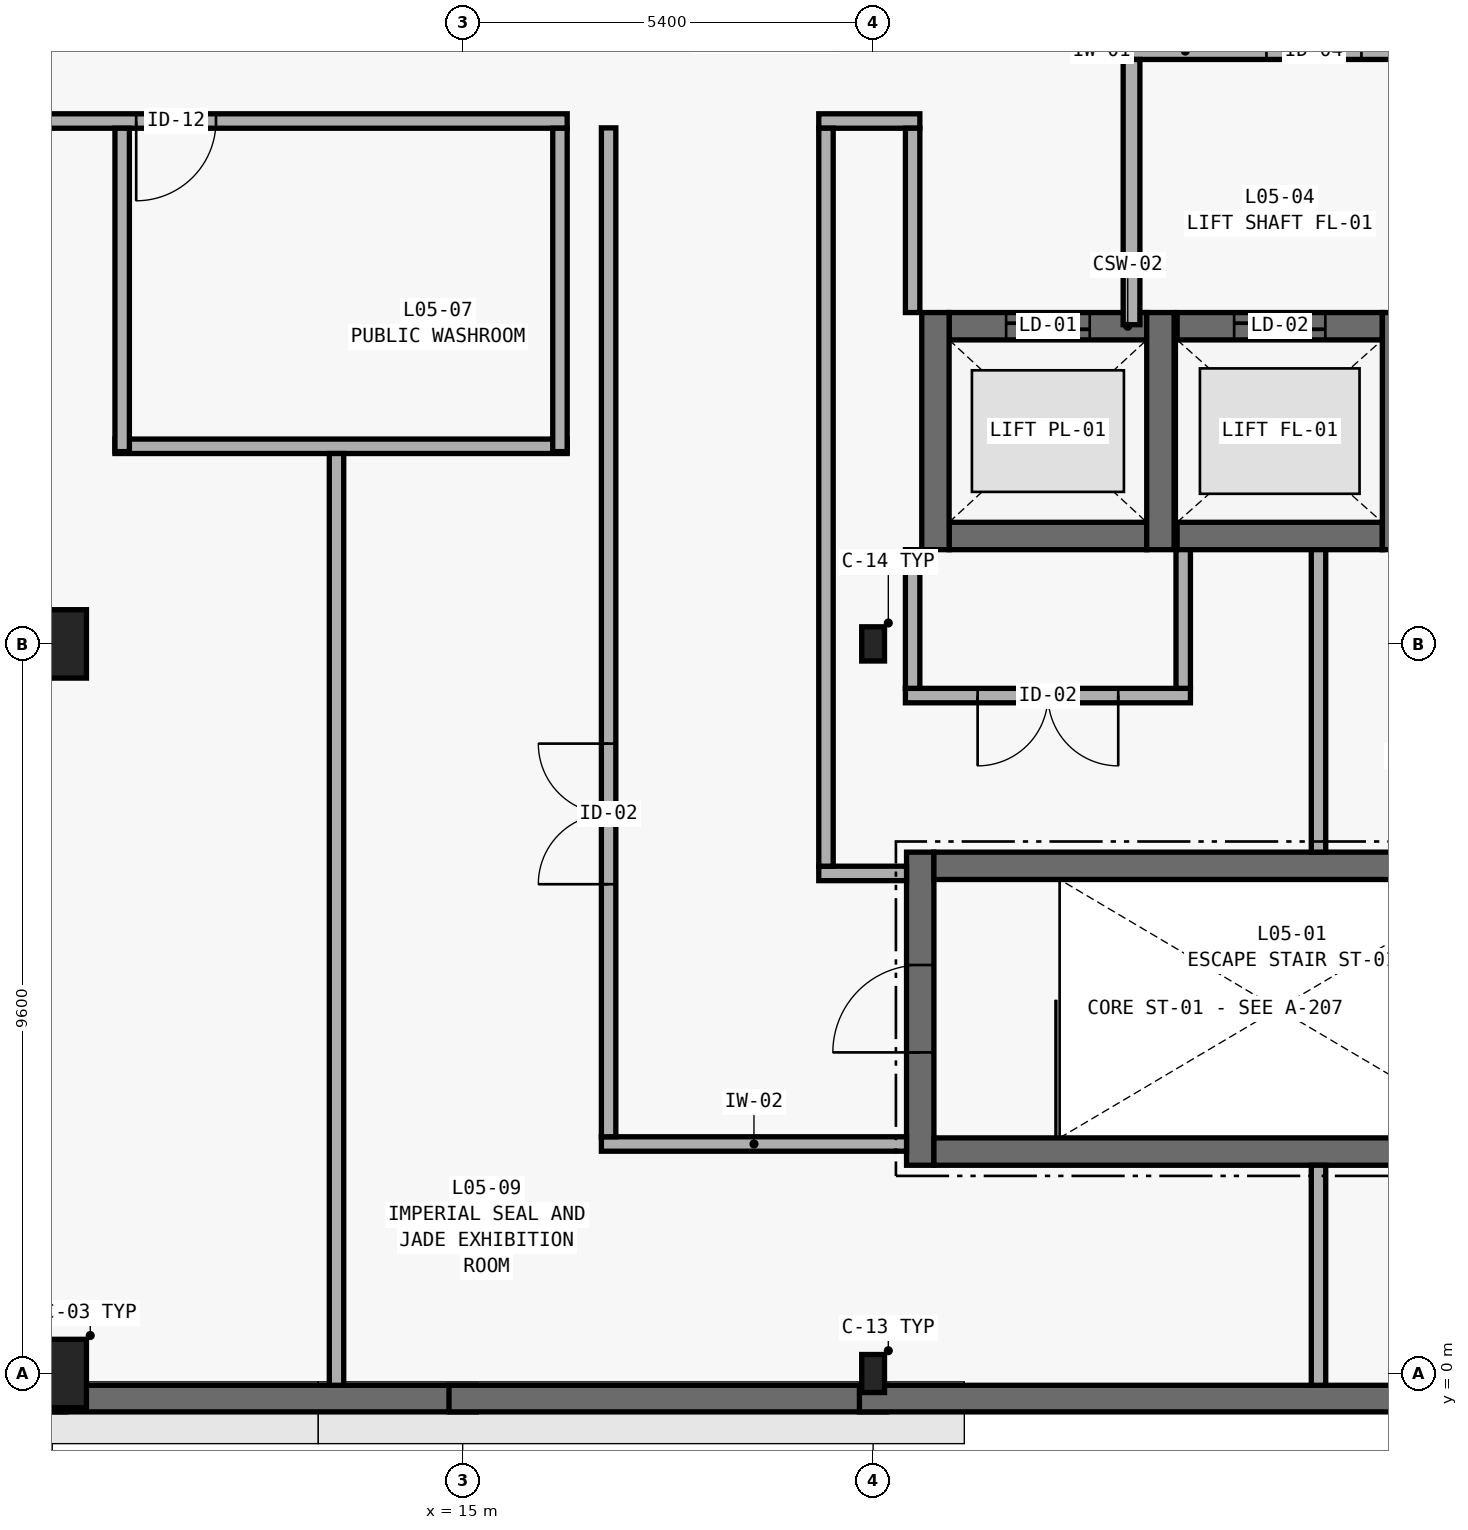
"""IFC4 building model, lengths in metres.
Left out: names, types, materials, properties, quantities, classifications, styles, units other than length and angle.
Written with IfcOpenShell. Run it as: python <this file> out.ifc"""

import sys

from ifc_helpers import new_model, si_unit, direction, frame, frame_2d, origin, origin_2d, place, context, subcontext, project, spatial, rectangle, i_section, extrude, element, fill, save


model = new_model("IFC4")
c1 = context("Model", 3, precision=1e-05, world=origin(), true_north=direction((0.0, 1.0)))
c2 = subcontext(c1, "Body", "Model", "MODEL_VIEW")
j1 = project(units=[si_unit("LENGTHUNIT", "METRE"), si_unit("PLANEANGLEUNIT", "RADIAN")], contexts=[c1])
p1 = place(None, origin())
s1 = spatial("IfcSite", under=j1, at=p1, CompositionType="ELEMENT")
p2 = place(p1, origin())
s2 = spatial("IfcBuilding", under=s1, at=p2, CompositionType="ELEMENT")
p3 = place(p2, frame((0.0, 0.0, 25.5)))
s3 = spatial("IfcBuildingStorey", under=s2, at=p3, CompositionType="ELEMENT", Elevation=25.5)
for number, where, z_axis, x_axis in (
    (1, (9.6, 0.0, 0.0), (0.0, 0.0, 1.0), (1.0, 0.0, 0.0)),
    (2, (9.6, 9.6, 0.0), (0.0, 0.0, 1.0), (1.0, 0.0, 0.0)),
):
    element("IfcColumn", number, at=place(p3, frame(where, z_axis=z_axis, x_axis=x_axis)), inside=s3, PredefinedType="COLUMN", context=c2, shape_type="SweptSolid", body=[
        extrude(rectangle(XDim=0.9, YDim=0.9, at=origin_2d()), origin(), (0.0, 0.0, 1.0), 4.2),
    ])
p4 = place(p3, frame((20.4, 0.0, 0.0), z_axis=(0.0, 0.0, 1.0), x_axis=(1.0, 0.0, 0.0)))
e3 = element("IfcColumn", 3, at=p4, inside=s3, PredefinedType="COLUMN", context=c2, shape_type="SweptSolid", body=[
    extrude(i_section(OverallWidth=0.3, OverallDepth=0.5, WebThickness=0.014, FlangeThickness=0.028, FilletRadius=0.027, at=origin_2d()), origin(), (0.0, 0.0, 1.0), 4.2),
])
p5 = place(p3, frame((20.4, 9.6, 0.0), z_axis=(0.0, 0.0, 1.0), x_axis=(1.0, 0.0, 0.0)))
e4 = element("IfcColumn", 4, at=p5, inside=s3, PredefinedType="COLUMN", context=c2, shape_type="SweptSolid", body=[
    extrude(i_section(OverallWidth=0.3, OverallDepth=0.45, WebThickness=0.014, FlangeThickness=0.026, FilletRadius=0.027, at=origin_2d()), origin(), (0.0, 0.0, 1.0), 4.2),
])
p6 = place(p3, frame((-0.06, -0.33, 0.0), z_axis=(0.0, 0.0, 1.0), x_axis=(1.0, 0.0, 0.0)))
e5 = element("IfcWall", 5, at=p6, inside=s3, PredefinedType="STANDARD", context=c2, shape_type="SweptSolid", body=[
    extrude(rectangle(XDim=9.84, YDim=0.35, at=frame_2d((4.92, 0.0))), origin(), (0.0, 0.0, 1.0), 3.9),
])
for number, where, z_axis, x_axis in (
    (6, (9.42, -0.33, 0.0), (0.0, 0.0, 1.0), (1.0, 0.0, 0.0)),
    (7, (14.82, -0.33, 0.0), (0.0, 0.0, 1.0), (1.0, 0.0, 0.0)),
):
    element("IfcWall", number, at=place(p3, frame(where, z_axis=z_axis, x_axis=x_axis)), inside=s3, PredefinedType="STANDARD", context=c2, shape_type="SweptSolid", body=[
        extrude(rectangle(XDim=5.76, YDim=0.35, at=frame_2d((2.88, 0.0))), origin(), (0.0, 0.0, 1.0), 3.9),
    ])
p7 = place(p3, frame((20.22, -0.33, 0.0), z_axis=(0.0, 0.0, 1.0), x_axis=(1.0, 0.0, 0.0)))
e8 = element("IfcWall", 8, at=p7, inside=s3, PredefinedType="STANDARD", context=c2, shape_type="SweptSolid", body=[
    extrude(rectangle(XDim=9.96, YDim=0.35, at=frame_2d((4.98, 0.0))), origin(), (0.0, 0.0, 1.0), 3.9),
])
p8 = place(p3, frame((21.02, 2.74, 0.0), z_axis=(0.0, 0.0, 1.0), x_axis=(0.0, 1.0, 0.0)))
e9 = element("IfcWall", 9, at=p8, inside=s3, PredefinedType="SHEAR", context=c2, shape_type="SweptSolid", body=[
    extrude(rectangle(XDim=4.12, YDim=0.36, at=frame_2d((2.06, 0.0))), origin(), (0.0, 0.0, 1.0), 3.96),
])
p9 = place(p8, frame((1.485, 0.0, 0.0)))
e10 = element("IfcOpeningElement", 10, at=p9, cuts=e9, PredefinedType="OPENING", context=c2, shape_type="SweptSolid", body=[
    extrude(rectangle(XDim=1.15, YDim=2.15, at=frame_2d((0.575, 1.075))), frame((0.0, 0.195, 0.0), z_axis=(0.0, -1.0, 0.0), x_axis=(1.0, 0.0, 0.0)), (0.0, 0.0, 1.0), 0.39),
])
for number, where, z_axis, x_axis in (
    (11, (21.2, 6.68, 0.0), (0.0, 0.0, 1.0), (1.0, 0.0, 0.0)),
    (12, (21.2, 2.92, 0.0), (0.0, 0.0, 1.0), (1.0, 0.0, 0.0)),
):
    element("IfcWall", number, at=place(p3, frame(where, z_axis=z_axis, x_axis=x_axis)), inside=s3, PredefinedType="SHEAR", context=c2, shape_type="SweptSolid", body=[
        extrude(rectangle(XDim=7.4, YDim=0.36, at=frame_2d((3.7, 0.0))), origin(), (0.0, 0.0, 1.0), 3.96),
    ])
p10 = place(p3, frame((21.4, 13.78, 0.0), z_axis=(0.0, 0.0, 1.0), x_axis=(1.0, 0.0, 0.0)))
e13 = element("IfcWall", 13, at=p10, inside=s3, PredefinedType="SHEAR", context=c2, shape_type="SweptSolid", body=[
    extrude(rectangle(XDim=2.6, YDim=0.36, at=frame_2d((1.3, 0.0))), origin(), (0.0, 0.0, 1.0), 3.96),
])
p11 = place(p10, frame((0.75, 0.0, 0.0)))
e14 = element("IfcOpeningElement", 14, at=p11, cuts=e13, PredefinedType="OPENING", context=c2, shape_type="SweptSolid", body=[
    extrude(rectangle(XDim=1.1, YDim=2.15, at=frame_2d((0.55, 1.075))), frame((0.0, 0.195, 0.0), z_axis=(0.0, -1.0, 0.0), x_axis=(1.0, 0.0, 0.0)), (0.0, 0.0, 1.0), 0.39),
])
p12 = place(p3, frame((21.4, 11.02, 0.0), z_axis=(0.0, 0.0, 1.0), x_axis=(1.0, 0.0, 0.0)))
e15 = element("IfcWall", 15, at=p12, inside=s3, PredefinedType="SHEAR", context=c2, shape_type="SweptSolid", body=[
    extrude(rectangle(XDim=2.6, YDim=0.36, at=frame_2d((1.3, 0.0))), origin(), (0.0, 0.0, 1.0), 3.96),
])
for number, where, z_axis, x_axis in (
    (16, (21.22, 10.84, 0.0), (0.0, 0.0, 1.0), (0.0, 1.0, 0.0)),
    (17, (24.18, 10.84, 0.0), (0.0, 0.0, 1.0), (0.0, 1.0, 0.0)),
):
    element("IfcWall", number, at=place(p3, frame(where, z_axis=z_axis, x_axis=x_axis)), inside=s3, PredefinedType="SHEAR", context=c2, shape_type="SweptSolid", body=[
        extrude(rectangle(XDim=3.12, YDim=0.36, at=frame_2d((1.56, 0.0))), origin(), (0.0, 0.0, 1.0), 3.96),
    ])
p13 = place(p3, frame((24.4, 13.78, 0.0), z_axis=(0.0, 0.0, 1.0), x_axis=(1.0, 0.0, 0.0)))
e18 = element("IfcWall", 18, at=p13, inside=s3, PredefinedType="SHEAR", context=c2, shape_type="SweptSolid", body=[
    extrude(rectangle(XDim=2.7, YDim=0.36, at=frame_2d((1.35, 0.0))), origin(), (0.0, 0.0, 1.0), 3.96),
])
p14 = place(p13, frame((0.75, 0.0, 0.0)))
e19 = element("IfcOpeningElement", 19, at=p14, cuts=e18, PredefinedType="OPENING", context=c2, shape_type="SweptSolid", body=[
    extrude(rectangle(XDim=1.2, YDim=2.15, at=frame_2d((0.6, 1.075))), frame((0.0, 0.195, 0.0), z_axis=(0.0, -1.0, 0.0), x_axis=(1.0, 0.0, 0.0)), (0.0, 0.0, 1.0), 0.39),
])
p15 = place(p3, frame((24.4, 11.02, 0.0), z_axis=(0.0, 0.0, 1.0), x_axis=(1.0, 0.0, 0.0)))
e20 = element("IfcWall", 20, at=p15, inside=s3, PredefinedType="SHEAR", context=c2, shape_type="SweptSolid", body=[
    extrude(rectangle(XDim=2.7, YDim=0.36, at=frame_2d((1.35, 0.0))), origin(), (0.0, 0.0, 1.0), 3.96),
])
p16 = place(p3, frame((27.28, 10.84, 0.0), z_axis=(0.0, 0.0, 1.0), x_axis=(0.0, 1.0, 0.0)))
e21 = element("IfcWall", 21, at=p16, inside=s3, PredefinedType="SHEAR", context=c2, shape_type="SweptSolid", body=[
    extrude(rectangle(XDim=3.12, YDim=0.36, at=frame_2d((1.56, 0.0))), origin(), (0.0, 0.0, 1.0), 3.96),
])
p17 = place(p3, frame((23.69, 17.4, 0.0), z_axis=(0.0, 0.0, 1.0), x_axis=(1.0, 0.0, 0.0)))
e22 = element("IfcWall", 22, at=p17, inside=s3, PredefinedType="PARTITIONING", context=c2, shape_type="SweptSolid", body=[
    extrude(rectangle(XDim=5.02, YDim=0.22, at=frame_2d((2.51, 0.0))), origin(), (0.0, 0.0, 1.0), 2.84),
])
p18 = place(p17, frame((1.885, 0.0, 0.0)))
e23 = element("IfcOpeningElement", 23, at=p18, cuts=e22, PredefinedType="OPENING", context=c2, shape_type="SweptSolid", body=[
    extrude(rectangle(XDim=1.25, YDim=2.15, at=frame_2d((0.625, 1.075))), frame((0.0, 0.125, 0.0), z_axis=(0.0, -1.0, 0.0), x_axis=(1.0, 0.0, 0.0)), (0.0, 0.0, 1.0), 0.25),
])
p19 = place(p3, frame((23.8, 13.8, 0.0), z_axis=(0.0, 0.0, 1.0), x_axis=(0.0, 1.0, 0.0)))
e24 = element("IfcWall", 24, at=p19, inside=s3, PredefinedType="PARTITIONING", context=c2, shape_type="SweptSolid", body=[
    extrude(rectangle(XDim=3.49, YDim=0.22, at=frame_2d((1.745, 0.0))), origin(), (0.0, 0.0, 1.0), 2.84),
])
p20 = place(p3, frame((16.825, 3.02, 0.0), z_axis=(0.0, 0.0, 1.0), x_axis=(1.0, 0.0, 0.0)))
e25 = element("IfcWall", 25, at=p20, inside=s3, PredefinedType="PARTITIONING", context=c2, shape_type="SweptSolid", body=[
    extrude(rectangle(XDim=4.015, YDim=0.19, at=frame_2d((2.008, 0.0))), origin(), (0.0, 0.0, 1.0), 2.84),
])
p21 = place(p3, frame((19.685, 6.58, 0.0), z_axis=(0.0, 0.0, 1.0), x_axis=(1.0, 0.0, 0.0)))
e26 = element("IfcWall", 26, at=p21, inside=s3, PredefinedType="PARTITIONING", context=c2, shape_type="SweptSolid", body=[
    extrude(rectangle(XDim=1.155, YDim=0.19, at=frame_2d((0.578, 0.0))), origin(), (0.0, 0.0, 1.0), 2.84),
])
p22 = place(p3, frame((20.825, 8.92, 0.0), z_axis=(0.0, 0.0, 1.0), x_axis=(1.0, 0.0, 0.0)))
e27 = element("IfcWall", 27, at=p22, inside=s3, PredefinedType="PARTITIONING", context=c2, shape_type="SweptSolid", body=[
    extrude(rectangle(XDim=3.75, YDim=0.19, at=frame_2d((1.875, 0.0))), origin(), (0.0, 0.0, 1.0), 2.84),
])
p23 = place(p22, frame((0.95, 0.0, 0.0)))
e28 = element("IfcOpeningElement", 28, at=p23, cuts=e27, PredefinedType="OPENING", context=c2, shape_type="SweptSolid", body=[
    extrude(rectangle(XDim=1.85, YDim=2.35, at=frame_2d((0.925, 1.175))), frame((0.0, 0.11, 0.0), z_axis=(0.0, -1.0, 0.0), x_axis=(1.0, 0.0, 0.0)), (0.0, 0.0, 1.0), 0.22),
])
p24 = place(p3, frame((10.425, 12.2, 0.0), z_axis=(0.0, 0.0, 1.0), x_axis=(1.0, 0.0, 0.0)))
e29 = element("IfcWall", 29, at=p24, inside=s3, PredefinedType="PARTITIONING", context=c2, shape_type="SweptSolid", body=[
    extrude(rectangle(XDim=5.95, YDim=0.19, at=frame_2d((2.975, 0.0))), origin(), (0.0, 0.0, 1.0), 2.84),
])
p25 = place(p3, frame((0.295, 16.48, 0.0), z_axis=(0.0, 0.0, 1.0), x_axis=(1.0, 0.0, 0.0)))
e30 = element("IfcWall", 30, at=p25, inside=s3, PredefinedType="PARTITIONING", context=c2, shape_type="SweptSolid", body=[
    extrude(rectangle(XDim=16.08, YDim=0.19, at=frame_2d((8.04, 0.0))), origin(), (0.0, 0.0, 1.0), 2.84),
])
p26 = place(p25, frame((10.409, 0.0, 0.0)))
e31 = element("IfcOpeningElement", 31, at=p26, cuts=e30, PredefinedType="OPENING", context=c2, shape_type="SweptSolid", body=[
    extrude(rectangle(XDim=1.05, YDim=2.1, at=frame_2d((0.525, 1.05))), frame((0.0, 0.11, 0.0), z_axis=(0.0, -1.0, 0.0), x_axis=(1.0, 0.0, 0.0)), (0.0, 0.0, 1.0), 0.22),
])
p27 = place(p25, frame((7.115, 0.0, 0.0)))
e32 = element("IfcOpeningElement", 32, at=p27, cuts=e30, PredefinedType="OPENING", context=c2, shape_type="SweptSolid", body=[
    extrude(rectangle(XDim=1.85, YDim=2.35, at=frame_2d((0.925, 1.175))), frame((0.0, 0.11, 0.0), z_axis=(0.0, -1.0, 0.0), x_axis=(1.0, 0.0, 0.0)), (0.0, 0.0, 1.0), 0.22),
])
p28 = place(p3, frame((19.685, 16.48, 0.0), z_axis=(0.0, 0.0, 1.0), x_axis=(1.0, 0.0, 0.0)))
e33 = element("IfcWall", 33, at=p28, inside=s3, PredefinedType="PARTITIONING", context=c2, shape_type="SweptSolid", body=[
    extrude(rectangle(XDim=1.33, YDim=0.19, at=frame_2d((0.665, 0.0))), origin(), (0.0, 0.0, 1.0), 2.84),
])
p29 = place(p3, frame((10.52, 12.13, 0.0), z_axis=(0.0, 0.0, 1.0), x_axis=(0.0, 1.0, 0.0)))
e34 = element("IfcWall", 34, at=p29, inside=s3, PredefinedType="PARTITIONING", context=c2, shape_type="SweptSolid", body=[
    extrude(rectangle(XDim=4.255, YDim=0.19, at=frame_2d((2.127, 0.0))), origin(), (0.0, 0.0, 1.0), 2.84),
])
p30 = place(p3, frame((13.34, -0.155, 0.0), z_axis=(0.0, 0.0, 1.0), x_axis=(0.0, 1.0, 0.0)))
e35 = element("IfcWall", 35, at=p30, inside=s3, PredefinedType="PARTITIONING", context=c2, shape_type="SweptSolid", body=[
    extrude(rectangle(XDim=12.26, YDim=0.19, at=frame_2d((6.13, 0.0))), origin(), (0.0, 0.0, 1.0), 2.84),
])
p31 = place(p3, frame((16.28, 12.13, 0.0), z_axis=(0.0, 0.0, 1.0), x_axis=(0.0, 1.0, 0.0)))
e36 = element("IfcWall", 36, at=p31, inside=s3, PredefinedType="PARTITIONING", context=c2, shape_type="SweptSolid", body=[
    extrude(rectangle(XDim=4.255, YDim=0.19, at=frame_2d((2.127, 0.0))), origin(), (0.0, 0.0, 1.0), 2.84),
])
p32 = place(p3, frame((16.92, 3.115, 0.0), z_axis=(0.0, 0.0, 1.0), x_axis=(0.0, 1.0, 0.0)))
e37 = element("IfcWall", 37, at=p32, inside=s3, PredefinedType="PARTITIONING", context=c2, shape_type="SweptSolid", body=[
    extrude(rectangle(XDim=13.275, YDim=0.19, at=frame_2d((6.637, 0.0))), origin(), (0.0, 0.0, 1.0), 2.84),
])
p33 = place(p32, frame((3.323, 0.0, 0.0)))
e38 = element("IfcOpeningElement", 38, at=p33, cuts=e37, PredefinedType="OPENING", context=c2, shape_type="SweptSolid", body=[
    extrude(rectangle(XDim=1.85, YDim=2.35, at=frame_2d((0.925, 1.175))), frame((0.0, 0.11, 0.0), z_axis=(0.0, -1.0, 0.0), x_axis=(1.0, 0.0, 0.0)), (0.0, 0.0, 1.0), 0.22),
])
p34 = place(p3, frame((19.78, 6.675, 0.0), z_axis=(0.0, 0.0, 1.0), x_axis=(0.0, 1.0, 0.0)))
e39 = element("IfcWall", 39, at=p34, inside=s3, PredefinedType="PARTITIONING", context=c2, shape_type="SweptSolid", body=[
    extrude(rectangle(XDim=9.71, YDim=0.19, at=frame_2d((4.855, 0.0))), origin(), (0.0, 0.0, 1.0), 2.84),
])
p35 = place(p3, frame((20.92, 9.015, 0.0), z_axis=(0.0, 0.0, 1.0), x_axis=(0.0, 1.0, 0.0)))
e40 = element("IfcWall", 40, at=p35, inside=s3, PredefinedType="PARTITIONING", context=c2, shape_type="SweptSolid", body=[
    extrude(rectangle(XDim=1.825, YDim=0.19, at=frame_2d((0.913, 0.0))), origin(), (0.0, 0.0, 1.0), 2.84),
])
p36 = place(p3, frame((20.92, 13.96, 0.0), z_axis=(0.0, 0.0, 1.0), x_axis=(0.0, 1.0, 0.0)))
e41 = element("IfcWall", 41, at=p36, inside=s3, PredefinedType="PARTITIONING", context=c2, shape_type="SweptSolid", body=[
    extrude(rectangle(XDim=2.425, YDim=0.19, at=frame_2d((1.212, 0.0))), origin(), (0.0, 0.0, 1.0), 2.84),
])
p37 = place(p3, frame((24.48, 9.015, 0.0), z_axis=(0.0, 0.0, 1.0), x_axis=(0.0, 1.0, 0.0)))
e42 = element("IfcWall", 42, at=p37, inside=s3, PredefinedType="PARTITIONING", context=c2, shape_type="SweptSolid", body=[
    extrude(rectangle(XDim=1.825, YDim=0.19, at=frame_2d((0.913, 0.0))), origin(), (0.0, 0.0, 1.0), 2.84),
])
p38 = place(p3, frame((26.26, -0.155, 0.0), z_axis=(0.0, 0.0, 1.0), x_axis=(0.0, 1.0, 0.0)))
e43 = element("IfcWall", 43, at=p38, inside=s3, PredefinedType="PARTITIONING", context=c2, shape_type="SweptSolid", body=[
    extrude(rectangle(XDim=2.895, YDim=0.19, at=frame_2d((1.448, 0.0))), origin(), (0.0, 0.0, 1.0), 2.84),
])
p39 = place(p3, frame((26.26, 6.86, 0.0), z_axis=(0.0, 0.0, 1.0), x_axis=(0.0, 1.0, 0.0)))
e44 = element("IfcWall", 44, at=p39, inside=s3, PredefinedType="PARTITIONING", context=c2, shape_type="SweptSolid", body=[
    extrude(rectangle(XDim=3.98, YDim=0.19, at=frame_2d((1.99, 0.0))), origin(), (0.0, 0.0, 1.0), 2.84),
])
p40 = place(p9, origin())
e45 = element("IfcDoor", 45, at=p40, inside=s3, OperationType="SINGLE_SWING_LEFT", PredefinedType="DOOR", context=c2, shape_type="SweptSolid", body=[
    extrude(rectangle(XDim=1.15, YDim=2.15, at=frame_2d((0.575, 1.075))), frame((0.0, 0.025, 0.0), z_axis=(0.0, -1.0, 0.0), x_axis=(1.0, 0.0, 0.0)), (0.0, 0.0, 1.0), 0.05),
])
fill(e10, e45)
p41 = place(p11, origin())
e46 = element("IfcDoor", 46, at=p41, inside=s3, OperationType="DOUBLE_DOOR_SLIDING", PredefinedType="DOOR", context=c2, shape_type="SweptSolid", body=[
    extrude(rectangle(XDim=1.1, YDim=2.15, at=frame_2d((0.55, 1.075))), frame((0.0, 0.025, 0.0), z_axis=(0.0, -1.0, 0.0), x_axis=(1.0, 0.0, 0.0)), (0.0, 0.0, 1.0), 0.05),
])
fill(e14, e46)
p42 = place(p14, origin())
e47 = element("IfcDoor", 47, at=p42, inside=s3, OperationType="DOUBLE_DOOR_SLIDING", PredefinedType="DOOR", context=c2, shape_type="SweptSolid", body=[
    extrude(rectangle(XDim=1.2, YDim=2.15, at=frame_2d((0.6, 1.075))), frame((0.0, 0.025, 0.0), z_axis=(0.0, -1.0, 0.0), x_axis=(1.0, 0.0, 0.0)), (0.0, 0.0, 1.0), 0.05),
])
fill(e19, e47)
p43 = place(p18, origin())
e48 = element("IfcDoor", 48, at=p43, inside=s3, OperationType="SINGLE_SWING_RIGHT", PredefinedType="DOOR", context=c2, shape_type="SweptSolid", body=[
    extrude(rectangle(XDim=1.25, YDim=2.15, at=frame_2d((0.625, 1.075))), frame((0.0, 0.025, 0.0), z_axis=(0.0, -1.0, 0.0), x_axis=(1.0, 0.0, 0.0)), (0.0, 0.0, 1.0), 0.05),
])
fill(e23, e48)
p44 = place(p26, frame((1.05, 0.0, 0.0), z_axis=(0.0, 0.0, 1.0), x_axis=(-1.0, 0.0, 0.0)))
e49 = element("IfcDoor", 49, at=p44, inside=s3, OperationType="SINGLE_SWING_LEFT", PredefinedType="DOOR", context=c2, shape_type="SweptSolid", body=[
    extrude(rectangle(XDim=1.05, YDim=2.1, at=frame_2d((0.525, 1.05))), frame((0.0, 0.025, 0.0), z_axis=(0.0, -1.0, 0.0), x_axis=(1.0, 0.0, 0.0)), (0.0, 0.0, 1.0), 0.05),
])
fill(e31, e49)
p45 = place(p33, origin())
e50 = element("IfcDoor", 50, at=p45, inside=s3, OperationType="DOUBLE_DOOR_SINGLE_SWING", PredefinedType="DOOR", context=c2, shape_type="SweptSolid", body=[
    extrude(rectangle(XDim=1.85, YDim=2.35, at=frame_2d((0.925, 1.175))), frame((0.0, 0.025, 0.0), z_axis=(0.0, -1.0, 0.0), x_axis=(1.0, 0.0, 0.0)), (0.0, 0.0, 1.0), 0.05),
])
fill(e38, e50)
p46 = place(p23, frame((1.85, 0.0, 0.0), z_axis=(0.0, 0.0, 1.0), x_axis=(-1.0, 0.0, 0.0)))
e51 = element("IfcDoor", 51, at=p46, inside=s3, OperationType="DOUBLE_DOOR_SINGLE_SWING", PredefinedType="DOOR", context=c2, shape_type="SweptSolid", body=[
    extrude(rectangle(XDim=1.85, YDim=2.35, at=frame_2d((0.925, 1.175))), frame((0.0, 0.025, 0.0), z_axis=(0.0, -1.0, 0.0), x_axis=(1.0, 0.0, 0.0)), (0.0, 0.0, 1.0), 0.05),
])
fill(e28, e51)
save(model, sys.argv[1])
